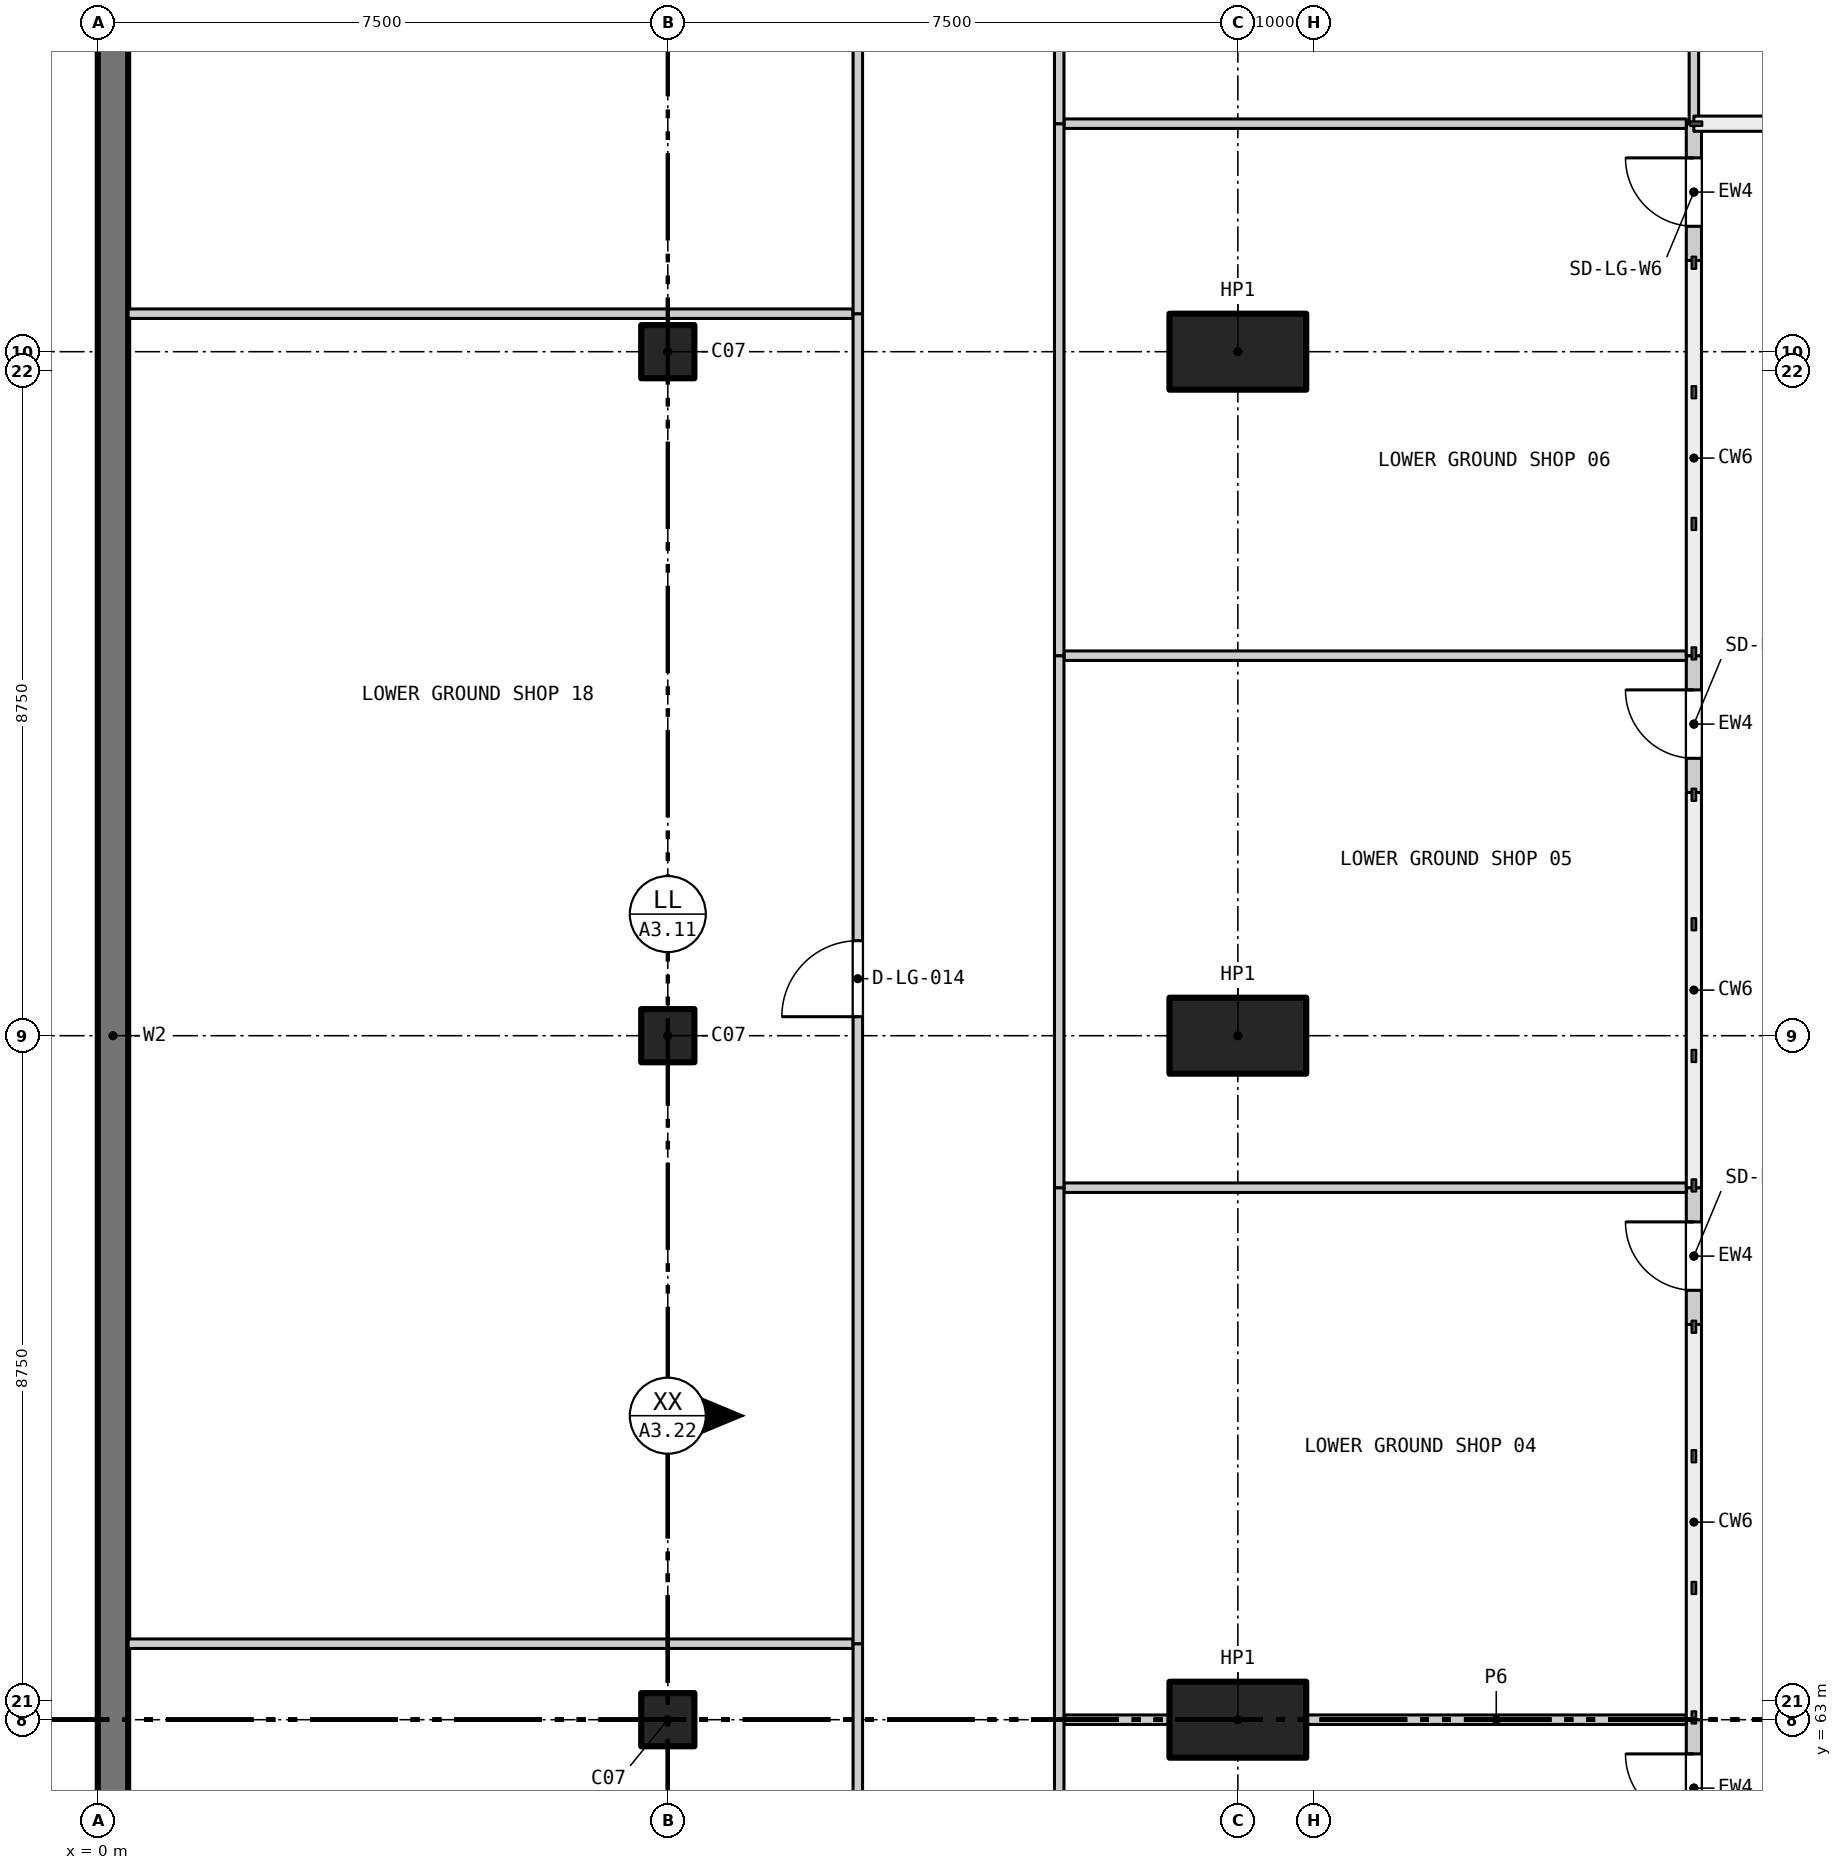
"""IFC4 building model, lengths in metres.
Left out: names, types, materials, properties, quantities, classifications, styles, units other than length and angle.
Written with IfcOpenShell. Run it as: python <this file> out.ifc"""

import sys

from ifc_helpers import new_model, si_unit, direction, frame, frame_2d, origin, origin_2d, place, context, subcontext, project, spatial, rectangle, extrude, element, fill, save


model = new_model("IFC4")
c1 = context("Model", 3, precision=1e-05, world=origin(), true_north=direction((0.0, 1.0)))
c2 = subcontext(c1, "Body", "Model", "MODEL_VIEW")
j1 = project(units=[si_unit("LENGTHUNIT", "METRE"), si_unit("PLANEANGLEUNIT", "RADIAN")], contexts=[c1])
p1 = place(None, origin())
s1 = spatial("IfcSite", under=j1, at=p1, CompositionType="ELEMENT")
p2 = place(p1, origin())
s2 = spatial("IfcBuilding", under=s1, at=p2, CompositionType="ELEMENT")
p3 = place(p2, frame((0.0, 0.0, -5.0)))
s3 = spatial("IfcBuildingStorey", under=s2, at=p3, CompositionType="ELEMENT", Elevation=-5.0)
for number, where, z_axis, x_axis in (
    (1, (7.5, 63.0, 0.0), (0.0, 0.0, 1.0), (1.0, 0.0, 0.0)),
    (2, (7.5, 72.0, 0.0), (0.0, 0.0, 1.0), (1.0, 0.0, 0.0)),
    (3, (7.5, 81.0, 0.0), (0.0, 0.0, 1.0), (1.0, 0.0, 0.0)),
):
    element("IfcColumn", number, at=place(p3, frame(where, z_axis=z_axis, x_axis=x_axis)), inside=s3, PredefinedType="COLUMN", context=c2, shape_type="SweptSolid", body=[
        extrude(rectangle(XDim=0.7, YDim=0.7, at=origin_2d()), origin(), (0.0, 0.0, 1.0), 5.0),
    ])
p4 = place(p3, frame((0.2, 18.0, 0.0), z_axis=(0.0, 0.0, 1.0), x_axis=(0.0, 1.0, 0.0)))
e4 = element("IfcWall", 4, at=p4, inside=s3, PredefinedType="SOLIDWALL", context=c2, shape_type="SweptSolid", body=[
    extrude(rectangle(XDim=108.0, YDim=0.4, at=frame_2d((54.0, 0.0))), origin(), (0.0, 0.0, 1.0), 5.0),
])
for number, where, z_axis, x_axis in (
    (5, (15.0, 63.0, 0.0), (0.0, 0.0, 1.0), (1.0, 0.0, 0.0)),
    (6, (15.0, 72.0, 0.0), (0.0, 0.0, 1.0), (1.0, 0.0, 0.0)),
    (7, (15.0, 81.0, 0.0), (0.0, 0.0, 1.0), (1.0, 0.0, 0.0)),
):
    element("IfcColumn", number, at=place(p3, frame(where, z_axis=z_axis, x_axis=x_axis)), inside=s3, PredefinedType="COLUMN", context=c2, shape_type="SweptSolid", body=[
        extrude(rectangle(XDim=1.8, YDim=1.0, at=origin_2d()), origin(), (0.0, 0.0, 1.0), 5.0),
    ])
p5 = place(p3, frame((21.0, 61.2, 0.0), z_axis=(0.0, 0.0, 1.0), x_axis=(0.0, 1.0, 0.0)))
e8 = element("IfcWall", 8, at=p5, inside=s3, PredefinedType="PARTITIONING", context=c2, shape_type="SweptSolid", body=[
    extrude(rectangle(XDim=1.8, YDim=0.2, at=frame_2d((0.9, 0.0))), origin(), (0.0, 0.0, 1.0), 4.65),
])
p6 = place(p5, frame((0.45, 0.0, 0.0)))
e9 = element("IfcOpeningElement", 9, at=p6, cuts=e8, PredefinedType="OPENING", context=c2, shape_type="SweptSolid", body=[
    extrude(rectangle(XDim=0.9, YDim=2.1, at=frame_2d((0.45, 1.05))), frame((0.0, 0.11, 0.0), z_axis=(0.0, -1.0, 0.0), x_axis=(1.0, 0.0, 0.0)), (0.0, 0.0, 1.0), 0.22),
])
p7 = place(p3, frame((21.0, 68.2, 0.0), z_axis=(0.0, 0.0, 1.0), x_axis=(0.0, 1.0, 0.0)))
e10 = element("IfcWall", 10, at=p7, inside=s3, PredefinedType="PARTITIONING", context=c2, shape_type="SweptSolid", body=[
    extrude(rectangle(XDim=1.8, YDim=0.2, at=frame_2d((0.9, 0.0))), origin(), (0.0, 0.0, 1.0), 4.65),
])
p8 = place(p7, frame((0.45, 0.0, 0.0)))
e11 = element("IfcOpeningElement", 11, at=p8, cuts=e10, PredefinedType="OPENING", context=c2, shape_type="SweptSolid", body=[
    extrude(rectangle(XDim=0.9, YDim=2.1, at=frame_2d((0.45, 1.05))), frame((0.0, 0.11, 0.0), z_axis=(0.0, -1.0, 0.0), x_axis=(1.0, 0.0, 0.0)), (0.0, 0.0, 1.0), 0.22),
])
p9 = place(p3, frame((21.0, 75.2, 0.0), z_axis=(0.0, 0.0, 1.0), x_axis=(0.0, 1.0, 0.0)))
e12 = element("IfcWall", 12, at=p9, inside=s3, PredefinedType="PARTITIONING", context=c2, shape_type="SweptSolid", body=[
    extrude(rectangle(XDim=1.8, YDim=0.2, at=frame_2d((0.9, 0.0))), origin(), (0.0, 0.0, 1.0), 4.65),
])
p10 = place(p9, frame((0.45, 0.0, 0.0)))
e13 = element("IfcOpeningElement", 13, at=p10, cuts=e12, PredefinedType="OPENING", context=c2, shape_type="SweptSolid", body=[
    extrude(rectangle(XDim=0.9, YDim=2.1, at=frame_2d((0.45, 1.05))), frame((0.0, 0.11, 0.0), z_axis=(0.0, -1.0, 0.0), x_axis=(1.0, 0.0, 0.0)), (0.0, 0.0, 1.0), 0.22),
])
p11 = place(p3, frame((21.0, 82.2, 0.0), z_axis=(0.0, 0.0, 1.0), x_axis=(0.0, 1.0, 0.0)))
e14 = element("IfcWall", 14, at=p11, inside=s3, PredefinedType="PARTITIONING", context=c2, shape_type="SweptSolid", body=[
    extrude(rectangle(XDim=1.8, YDim=0.2, at=frame_2d((0.9, 0.0))), origin(), (0.0, 0.0, 1.0), 4.65),
])
p12 = place(p11, frame((0.45, 0.0, 0.0)))
e15 = element("IfcOpeningElement", 15, at=p12, cuts=e14, PredefinedType="OPENING", context=c2, shape_type="SweptSolid", body=[
    extrude(rectangle(XDim=0.9, YDim=2.1, at=frame_2d((0.45, 1.05))), frame((0.0, 0.11, 0.0), z_axis=(0.0, -1.0, 0.0), x_axis=(1.0, 0.0, 0.0)), (0.0, 0.0, 1.0), 0.22),
])
p13 = place(p3, frame((12.712, 63.0, 0.0), z_axis=(0.0, 0.0, 1.0), x_axis=(1.0, 0.0, 0.0)))
e16 = element("IfcWall", 16, at=p13, inside=s3, PredefinedType="PARTITIONING", context=c2, shape_type="SweptSolid", body=[
    extrude(rectangle(XDim=1.388, YDim=0.125, at=frame_2d((0.694, 0.0))), origin(), (0.0, 0.0, 1.0), 4.0),
])
p14 = place(p3, frame((15.9, 63.0, 0.0), z_axis=(0.0, 0.0, 1.0), x_axis=(1.0, 0.0, 0.0)))
e17 = element("IfcWall", 17, at=p14, inside=s3, PredefinedType="PARTITIONING", context=c2, shape_type="SweptSolid", body=[
    extrude(rectangle(XDim=5.0, YDim=0.125, at=frame_2d((2.5, 0.0))), origin(), (0.0, 0.0, 1.0), 3.75),
])
p15 = place(p3, frame((0.4, 64.0, 0.0), z_axis=(0.0, 0.0, 1.0), x_axis=(1.0, 0.0, 0.0)))
e18 = element("IfcWall", 18, at=p15, inside=s3, PredefinedType="PARTITIONING", context=c2, shape_type="SweptSolid", body=[
    extrude(rectangle(XDim=9.538, YDim=0.125, at=frame_2d((4.769, 0.0))), origin(), (0.0, 0.0, 1.0), 4.7),
])
for number, where, z_axis, x_axis in (
    (19, (12.712, 70.0, 0.0), (0.0, 0.0, 1.0), (1.0, 0.0, 0.0)),
    (20, (12.712, 77.0, 0.0), (0.0, 0.0, 1.0), (1.0, 0.0, 0.0)),
):
    element("IfcWall", number, at=place(p3, frame(where, z_axis=z_axis, x_axis=x_axis)), inside=s3, PredefinedType="PARTITIONING", context=c2, shape_type="SweptSolid", body=[
        extrude(rectangle(XDim=8.188, YDim=0.125, at=frame_2d((4.094, 0.0))), origin(), (0.0, 0.0, 1.0), 4.65),
    ])
p16 = place(p3, frame((0.4, 81.5, 0.0), z_axis=(0.0, 0.0, 1.0), x_axis=(1.0, 0.0, 0.0)))
e21 = element("IfcWall", 21, at=p16, inside=s3, PredefinedType="PARTITIONING", context=c2, shape_type="SweptSolid", body=[
    extrude(rectangle(XDim=9.538, YDim=0.125, at=frame_2d((4.769, 0.0))), origin(), (0.0, 0.0, 1.0), 4.7),
])
p17 = place(p3, frame((12.712, 84.0, 0.0), z_axis=(0.0, 0.0, 1.0), x_axis=(1.0, 0.0, 0.0)))
e22 = element("IfcWall", 22, at=p17, inside=s3, PredefinedType="PARTITIONING", context=c2, shape_type="SweptSolid", body=[
    extrude(rectangle(XDim=8.188, YDim=0.125, at=frame_2d((4.094, 0.0))), origin(), (0.0, 0.0, 1.0), 4.65),
])
p18 = place(p3, frame((10.0, 46.5, 0.0), z_axis=(0.0, 0.0, 1.0), x_axis=(0.0, 1.0, 0.0)))
e23 = element("IfcWall", 23, at=p18, inside=s3, PredefinedType="PARTITIONING", context=c2, shape_type="SweptSolid", body=[
    extrude(rectangle(XDim=17.5, YDim=0.125, at=frame_2d((8.75, 0.0))), origin(), (0.0, 0.0, 1.0), 4.7),
])
p19 = place(p18, frame((8.25, 0.0, 0.0)))
e24 = element("IfcOpeningElement", 24, at=p19, cuts=e23, PredefinedType="OPENING", context=c2, shape_type="SweptSolid", body=[
    extrude(rectangle(XDim=1.0, YDim=2.1, at=frame_2d((0.5, 1.05))), frame((0.0, 0.073, 0.0), z_axis=(0.0, -1.0, 0.0), x_axis=(1.0, 0.0, 0.0)), (0.0, 0.0, 1.0), 0.145),
])
p20 = place(p3, frame((10.0, 64.0, 0.0), z_axis=(0.0, 0.0, 1.0), x_axis=(0.0, 1.0, 0.0)))
e25 = element("IfcWall", 25, at=p20, inside=s3, PredefinedType="PARTITIONING", context=c2, shape_type="SweptSolid", body=[
    extrude(rectangle(XDim=17.5, YDim=0.125, at=frame_2d((8.75, 0.0))), origin(), (0.0, 0.0, 1.0), 4.7),
])
p21 = place(p20, frame((8.25, 0.0, 0.0)))
e26 = element("IfcOpeningElement", 26, at=p21, cuts=e25, PredefinedType="OPENING", context=c2, shape_type="SweptSolid", body=[
    extrude(rectangle(XDim=1.0, YDim=2.1, at=frame_2d((0.5, 1.05))), frame((0.0, 0.073, 0.0), z_axis=(0.0, -1.0, 0.0), x_axis=(1.0, 0.0, 0.0)), (0.0, 0.0, 1.0), 0.145),
])
p22 = place(p3, frame((10.0, 81.5, 0.0), z_axis=(0.0, 0.0, 1.0), x_axis=(0.0, 1.0, 0.0)))
e27 = element("IfcWall", 27, at=p22, inside=s3, PredefinedType="PARTITIONING", context=c2, shape_type="SweptSolid", body=[
    extrude(rectangle(XDim=17.5, YDim=0.125, at=frame_2d((8.75, 0.0))), origin(), (0.0, 0.0, 1.0), 4.7),
])
p23 = place(p22, frame((8.25, 0.0, 0.0)))
e28 = element("IfcOpeningElement", 28, at=p23, cuts=e27, PredefinedType="OPENING", context=c2, shape_type="SweptSolid", body=[
    extrude(rectangle(XDim=1.0, YDim=2.1, at=frame_2d((0.5, 1.05))), frame((0.0, 0.073, 0.0), z_axis=(0.0, -1.0, 0.0), x_axis=(1.0, 0.0, 0.0)), (0.0, 0.0, 1.0), 0.145),
])
for number, where, z_axis, x_axis in (
    (29, (12.65, 56.0, 0.0), (0.0, 0.0, 1.0), (0.0, 1.0, 0.0)),
    (30, (12.65, 63.0, 0.0), (0.0, 0.0, 1.0), (0.0, 1.0, 0.0)),
    (31, (12.65, 70.0, 0.0), (0.0, 0.0, 1.0), (0.0, 1.0, 0.0)),
    (32, (12.65, 77.0, 0.0), (0.0, 0.0, 1.0), (0.0, 1.0, 0.0)),
):
    element("IfcWall", number, at=place(p3, frame(where, z_axis=z_axis, x_axis=x_axis)), inside=s3, PredefinedType="PARTITIONING", context=c2, shape_type="SweptSolid", body=[
        extrude(rectangle(XDim=7.0, YDim=0.125, at=frame_2d((3.5, 0.0))), origin(), (0.0, 0.0, 1.0), 4.65),
    ])
p24 = place(p3, frame((12.65, 84.0, 0.0), z_axis=(0.0, 0.0, 1.0), x_axis=(0.0, 1.0, 0.0)))
e33 = element("IfcWall", 33, at=p24, inside=s3, PredefinedType="PARTITIONING", context=c2, shape_type="SweptSolid", body=[
    extrude(rectangle(XDim=15.0, YDim=0.125, at=frame_2d((7.5, 0.0))), origin(), (0.0, 0.0, 1.0), 4.65),
])
p25 = place(p24, frame((7.0, 0.0, 0.0)))
e34 = element("IfcOpeningElement", 34, at=p25, cuts=e33, PredefinedType="OPENING", context=c2, shape_type="SweptSolid", body=[
    extrude(rectangle(XDim=1.0, YDim=2.1, at=frame_2d((0.5, 1.05))), frame((0.0, 0.073, 0.0), z_axis=(0.0, -1.0, 0.0), x_axis=(1.0, 0.0, 0.0)), (0.0, 0.0, 1.0), 0.145),
])
p26 = place(p3, frame((21.0, 84.0, 0.0), z_axis=(0.0, 0.0, 1.0), x_axis=(0.0, 1.0, 0.0)))
e35 = element("IfcWall", 35, at=p26, inside=s3, PredefinedType="PARTITIONING", context=c2, shape_type="SweptSolid", body=[
    extrude(rectangle(XDim=14.925, YDim=0.125, at=frame_2d((7.462, 0.0))), origin(), (0.0, 0.0, 1.0), 4.65),
])
p27 = place(p6, origin())
e36 = element("IfcDoor", 36, at=p27, inside=s3, OperationType="SINGLE_SWING_RIGHT", PredefinedType="DOOR", context=c2, shape_type="SweptSolid", body=[
    extrude(rectangle(XDim=0.9, YDim=2.1, at=frame_2d((0.45, 1.05))), frame((0.0, 0.025, 0.0), z_axis=(0.0, -1.0, 0.0), x_axis=(1.0, 0.0, 0.0)), (0.0, 0.0, 1.0), 0.05),
])
fill(e9, e36)
p28 = place(p8, origin())
e37 = element("IfcDoor", 37, at=p28, inside=s3, OperationType="SINGLE_SWING_RIGHT", PredefinedType="DOOR", context=c2, shape_type="SweptSolid", body=[
    extrude(rectangle(XDim=0.9, YDim=2.1, at=frame_2d((0.45, 1.05))), frame((0.0, 0.025, 0.0), z_axis=(0.0, -1.0, 0.0), x_axis=(1.0, 0.0, 0.0)), (0.0, 0.0, 1.0), 0.05),
])
fill(e11, e37)
p29 = place(p10, origin())
e38 = element("IfcDoor", 38, at=p29, inside=s3, OperationType="SINGLE_SWING_RIGHT", PredefinedType="DOOR", context=c2, shape_type="SweptSolid", body=[
    extrude(rectangle(XDim=0.9, YDim=2.1, at=frame_2d((0.45, 1.05))), frame((0.0, 0.025, 0.0), z_axis=(0.0, -1.0, 0.0), x_axis=(1.0, 0.0, 0.0)), (0.0, 0.0, 1.0), 0.05),
])
fill(e13, e38)
p30 = place(p12, origin())
e39 = element("IfcDoor", 39, at=p30, inside=s3, OperationType="SINGLE_SWING_RIGHT", PredefinedType="DOOR", context=c2, shape_type="SweptSolid", body=[
    extrude(rectangle(XDim=0.9, YDim=2.1, at=frame_2d((0.45, 1.05))), frame((0.0, 0.025, 0.0), z_axis=(0.0, -1.0, 0.0), x_axis=(1.0, 0.0, 0.0)), (0.0, 0.0, 1.0), 0.05),
])
fill(e15, e39)
p31 = place(p21, origin())
e40 = element("IfcDoor", 40, at=p31, inside=s3, OperationType="SINGLE_SWING_LEFT", PredefinedType="DOOR", context=c2, shape_type="SweptSolid", body=[
    extrude(rectangle(XDim=1.0, YDim=2.1, at=frame_2d((0.5, 1.05))), frame((0.0, 0.025, 0.0), z_axis=(0.0, -1.0, 0.0), x_axis=(1.0, 0.0, 0.0)), (0.0, 0.0, 1.0), 0.05),
])
fill(e26, e40)
save(model, sys.argv[1])
